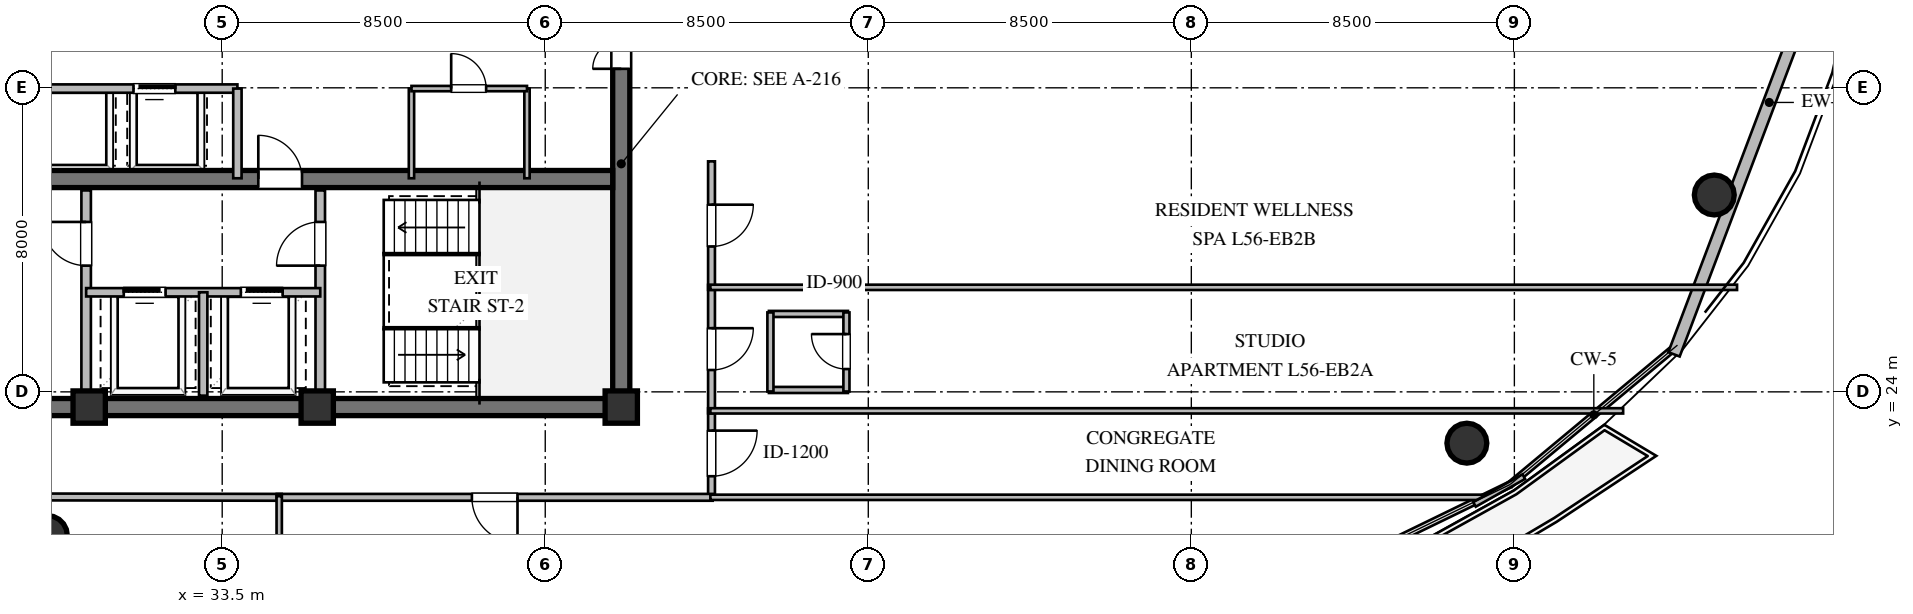
"""IFC4 building model, lengths in metres.
Left out: names, types, materials, properties, quantities, classifications, styles, units other than length and angle.
Written with IfcOpenShell. Run it as: python <this file> out.ifc"""

import sys

from ifc_helpers import new_model, si_unit, direction, frame, frame_2d, origin, origin_2d, place, context, subcontext, project, spatial, rectangle, circle, extrude, element, fill, save


model = new_model("IFC4")
c1 = context("Model", 3, precision=1e-05, world=origin(), true_north=direction((0.0, 1.0)))
c2 = subcontext(c1, "Body", "Model", "MODEL_VIEW")
j1 = project(units=[si_unit("LENGTHUNIT", "METRE"), si_unit("PLANEANGLEUNIT", "RADIAN")], contexts=[c1])
p1 = place(None, origin())
s1 = spatial("IfcSite", under=j1, at=p1, CompositionType="ELEMENT")
p2 = place(p1, origin())
s2 = spatial("IfcBuilding", under=s1, at=p2, CompositionType="ELEMENT")
p3 = place(p2, frame((0.0, 0.0, 213.6)))
s3 = spatial("IfcBuildingStorey", under=s2, at=p3, CompositionType="ELEMENT", Elevation=213.6)
p4 = place(p3, frame((21.775, 23.6, 0.0), z_axis=(0.0, 0.0, 1.0), x_axis=(1.0, 0.0, 0.0)))
e1 = element("IfcWall", 1, at=p4, inside=s3, PredefinedType="SHEAR", context=c2, shape_type="SweptSolid", body=[
    extrude(rectangle(XDim=22.45, YDim=0.45, at=frame_2d((11.225, 0.0))), origin(), (0.0, 0.0, 1.0), 3.36),
])
p5 = place(p3, frame((44.0, 23.825, 0.0), z_axis=(0.0, 0.0, 1.0), x_axis=(0.0, 1.0, 0.0)))
e2 = element("IfcWall", 2, at=p5, inside=s3, PredefinedType="SHEAR", context=c2, shape_type="SweptSolid", body=[
    extrude(rectangle(XDim=12.35, YDim=0.45, at=frame_2d((6.175, 0.0))), origin(), (0.0, 0.0, 1.0), 3.36),
])
p6 = place(p5, frame((8.675, 0.0, 0.0)))
e3 = element("IfcOpeningElement", 3, at=p6, cuts=e2, PredefinedType="OPENING", context=c2, shape_type="SweptSolid", body=[
    extrude(rectangle(XDim=1.5, YDim=2.15, at=frame_2d((0.75, 1.075))), frame((0.0, 0.235, 0.0), z_axis=(0.0, -1.0, 0.0), x_axis=(1.0, 0.0, 0.0)), (0.0, 0.0, 1.0), 0.47),
])
p7 = place(p3, frame((22.225, 29.6, 0.0), z_axis=(0.0, 0.0, 1.0), x_axis=(1.0, 0.0, 0.0)))
e4 = element("IfcWall", 4, at=p7, inside=s3, PredefinedType="SHEAR", context=c2, shape_type="SweptSolid", body=[
    extrude(rectangle(XDim=21.55, YDim=0.45, at=frame_2d((10.775, 0.0))), origin(), (0.0, 0.0, 1.0), 3.36),
])
p8 = place(p7, frame((12.225, 0.0, 0.0)))
e5 = element("IfcOpeningElement", 5, at=p8, cuts=e4, PredefinedType="OPENING", context=c2, shape_type="SweptSolid", body=[
    extrude(rectangle(XDim=1.15, YDim=2.1, at=frame_2d((0.575, 1.05))), frame((0.0, 0.235, 0.0), z_axis=(0.0, -1.0, 0.0), x_axis=(1.0, 0.0, 0.0)), (0.0, 0.0, 1.0), 0.47),
])
for number, where, z_axis, x_axis in (
    (6, (30.0, 23.6, 0.0), (0.0, 0.0, 1.0), (1.0, 0.0, 0.0)),
    (7, (36.0, 23.6, 0.0), (0.0, 0.0, 1.0), (1.0, 0.0, 0.0)),
    (8, (44.0, 23.6, 0.0), (0.0, 0.0, 1.0), (1.0, 0.0, 0.0)),
):
    element("IfcColumn", number, at=place(p3, frame(where, z_axis=z_axis, x_axis=x_axis)), inside=s3, PredefinedType="COLUMN", context=c2, shape_type="SweptSolid", body=[
        extrude(rectangle(XDim=0.85, YDim=0.85, at=origin_2d()), origin(), (0.0, 0.0, 1.0), 3.6),
    ])
for number, where, z_axis, x_axis in (
    (9, (28.9, 20.22, 0.0), (0.0, 0.0, 1.0), (1.0, 0.0, 0.0)),
    (10, (66.25, 22.65, 0.0), (0.0, 0.0, 1.0), (1.0, 0.0, 0.0)),
    (11, (72.76, 29.18, 0.0), (0.0, 0.0, 1.0), (1.0, 0.0, 0.0)),
):
    element("IfcColumn", number, at=place(p3, frame(where, z_axis=z_axis, x_axis=x_axis)), inside=s3, PredefinedType="COLUMN", context=c2, shape_type="SweptSolid", body=[
        extrude(circle(Radius=0.525, at=origin_2d()), origin(), (0.0, 0.0, 1.0), 3.6),
    ])
p9 = place(p3, frame((76.712, 38.243, 0.0), z_axis=(0.0, 0.0, 1.0), x_axis=(-0.353659523244, -0.935374225441, 0.0)))
e12 = element("IfcWall", 12, at=p9, inside=s3, PredefinedType="STANDARD", context=c2, shape_type="SweptSolid", body=[
    extrude(rectangle(XDim=14.172, YDim=0.32, at=frame_2d((7.086, 0.0))), origin(), (0.0, 0.0, 1.0), 3.36),
])
p10 = place(p3, frame((29.92, 23.9, 0.0), z_axis=(0.0, 0.0, 1.0), x_axis=(0.0, 1.0, 0.0)))
e13 = element("IfcWall", 13, at=p10, inside=s3, PredefinedType="SOLIDWALL", context=c2, shape_type="SweptSolid", body=[
    extrude(rectangle(XDim=5.4, YDim=0.25, at=frame_2d((2.7, 0.0))), origin(), (0.0, 0.0, 1.0), 3.36),
])
p11 = place(p10, frame((3.421, 0.0, 0.0)))
e14 = element("IfcOpeningElement", 14, at=p11, cuts=e13, PredefinedType="OPENING", context=c2, shape_type="SweptSolid", body=[
    extrude(rectangle(XDim=1.15, YDim=2.1, at=frame_2d((0.575, 1.05))), frame((0.0, 0.135, 0.0), z_axis=(0.0, -1.0, 0.0), x_axis=(1.0, 0.0, 0.0)), (0.0, 0.0, 1.0), 0.27),
])
p12 = place(p3, frame((36.08, 23.9, 0.0), z_axis=(0.0, 0.0, 1.0), x_axis=(0.0, 1.0, 0.0)))
e15 = element("IfcWall", 15, at=p12, inside=s3, PredefinedType="SOLIDWALL", context=c2, shape_type="SweptSolid", body=[
    extrude(rectangle(XDim=5.4, YDim=0.25, at=frame_2d((2.7, 0.0))), origin(), (0.0, 0.0, 1.0), 3.36),
])
p13 = place(p12, frame((3.421, 0.0, 0.0)))
e16 = element("IfcOpeningElement", 16, at=p13, cuts=e15, PredefinedType="OPENING", context=c2, shape_type="SweptSolid", body=[
    extrude(rectangle(XDim=1.15, YDim=2.1, at=frame_2d((0.575, 1.05))), frame((0.0, 0.135, 0.0), z_axis=(0.0, -1.0, 0.0), x_axis=(1.0, 0.0, 0.0)), (0.0, 0.0, 1.0), 0.27),
])
p14 = place(p3, frame((29.92, 26.62, 0.0), z_axis=(0.0, 0.0, 1.0), x_axis=(1.0, 0.0, 0.0)))
e17 = element("IfcWall", 17, at=p14, inside=s3, PredefinedType="SOLIDWALL", context=c2, shape_type="SweptSolid", body=[
    extrude(rectangle(XDim=6.16, YDim=0.22, at=frame_2d((3.08, 0.0))), origin(), (0.0, 0.0, 1.0), 3.36),
])
p15 = place(p14, frame((0.99, 0.0, 0.0)))
e18 = element("IfcOpeningElement", 18, at=p15, cuts=e17, PredefinedType="OPENING", context=c2, shape_type="SweptSolid", body=[
    extrude(rectangle(XDim=1.1, YDim=2.1, at=frame_2d((0.55, 1.05))), frame((0.0, 0.12, 0.0), z_axis=(0.0, -1.0, 0.0), x_axis=(1.0, 0.0, 0.0)), (0.0, 0.0, 1.0), 0.24),
])
p16 = place(p14, frame((4.07, 0.0, 0.0)))
e19 = element("IfcOpeningElement", 19, at=p16, cuts=e17, PredefinedType="OPENING", context=c2, shape_type="SweptSolid", body=[
    extrude(rectangle(XDim=1.1, YDim=2.1, at=frame_2d((0.55, 1.05))), frame((0.0, 0.12, 0.0), z_axis=(0.0, -1.0, 0.0), x_axis=(1.0, 0.0, 0.0)), (0.0, 0.0, 1.0), 0.24),
])
p17 = place(p3, frame((33.0, 23.9, 0.0), z_axis=(0.0, 0.0, 1.0), x_axis=(0.0, 1.0, 0.0)))
e20 = element("IfcWall", 20, at=p17, inside=s3, PredefinedType="SOLIDWALL", context=c2, shape_type="SweptSolid", body=[
    extrude(rectangle(XDim=2.72, YDim=0.22, at=frame_2d((1.36, 0.0))), origin(), (0.0, 0.0, 1.0), 3.36),
])
p18 = place(p3, frame((26.1, 31.98, 0.0), z_axis=(0.0, 0.0, 1.0), x_axis=(1.0, 0.0, 0.0)))
e21 = element("IfcWall", 21, at=p18, inside=s3, PredefinedType="SOLIDWALL", context=c2, shape_type="SweptSolid", body=[
    extrude(rectangle(XDim=7.8, YDim=0.22, at=frame_2d((3.9, 0.0))), origin(), (0.0, 0.0, 1.0), 3.36),
])
p19 = place(p18, frame((1.4, 0.0, 0.0)))
e22 = element("IfcOpeningElement", 22, at=p19, cuts=e21, PredefinedType="OPENING", context=c2, shape_type="SweptSolid", body=[
    extrude(rectangle(XDim=1.1, YDim=2.1, at=frame_2d((0.55, 1.05))), frame((0.0, 0.12, 0.0), z_axis=(0.0, -1.0, 0.0), x_axis=(1.0, 0.0, 0.0)), (0.0, 0.0, 1.0), 0.24),
])
p20 = place(p18, frame((5.066, 0.0, 0.0)))
e23 = element("IfcOpeningElement", 23, at=p20, cuts=e21, PredefinedType="OPENING", context=c2, shape_type="SweptSolid", body=[
    extrude(rectangle(XDim=1.1, YDim=2.1, at=frame_2d((0.55, 1.05))), frame((0.0, 0.12, 0.0), z_axis=(0.0, -1.0, 0.0), x_axis=(1.0, 0.0, 0.0)), (0.0, 0.0, 1.0), 0.24),
])
p21 = place(p3, frame((33.9, 29.62, 0.0), z_axis=(0.0, 0.0, 1.0), x_axis=(0.0, 1.0, 0.0)))
e24 = element("IfcWall", 24, at=p21, inside=s3, PredefinedType="SOLIDWALL", context=c2, shape_type="SweptSolid", body=[
    extrude(rectangle(XDim=2.36, YDim=0.22, at=frame_2d((1.18, 0.0))), origin(), (0.0, 0.0, 1.0), 3.36),
])
for number, where, z_axis, x_axis in (
    (25, (38.48, 29.62, 0.0), (0.0, 0.0, 1.0), (0.0, 1.0, 0.0)),
    (26, (41.52, 29.62, 0.0), (0.0, 0.0, 1.0), (0.0, 1.0, 0.0)),
):
    element("IfcWall", number, at=place(p3, frame(where, z_axis=z_axis, x_axis=x_axis)), inside=s3, PredefinedType="PARTITIONING", context=c2, shape_type="SweptSolid", body=[
        extrude(rectangle(XDim=2.36, YDim=0.14, at=frame_2d((1.18, 0.0))), origin(), (0.0, 0.0, 1.0), 3.36),
    ])
p22 = place(p3, frame((38.48, 31.98, 0.0), z_axis=(0.0, 0.0, 1.0), x_axis=(1.0, 0.0, 0.0)))
e27 = element("IfcWall", 27, at=p22, inside=s3, PredefinedType="PARTITIONING", context=c2, shape_type="SweptSolid", body=[
    extrude(rectangle(XDim=3.04, YDim=0.14, at=frame_2d((1.52, 0.0))), origin(), (0.0, 0.0, 1.0), 3.36),
])
p23 = place(p22, frame((1.045, 0.0, 0.0)))
e28 = element("IfcOpeningElement", 28, at=p23, cuts=e27, PredefinedType="OPENING", context=c2, shape_type="SweptSolid", body=[
    extrude(rectangle(XDim=0.92, YDim=2.1, at=frame_2d((0.46, 1.05))), frame((0.0, 0.08, 0.0), z_axis=(0.0, -1.0, 0.0), x_axis=(1.0, 0.0, 0.0)), (0.0, 0.0, 1.0), 0.16),
])
p24 = place(p3, frame((47.885, 24.05, 0.0), z_axis=(0.0, 0.0, 1.0), x_axis=(1.0, 0.0, 0.0)))
e29 = element("IfcWall", 29, at=p24, inside=s3, PredefinedType="PLUMBINGWALL", context=c2, shape_type="SweptSolid", body=[
    extrude(rectangle(XDim=2.08, YDim=0.16, at=frame_2d((1.04, 0.0))), origin(), (0.0, 0.0, 1.0), 2.806),
])
for number, where, z_axis, x_axis in (
    (30, (47.885, 26.05, 0.0), (0.0, 0.0, 1.0), (1.0, 0.0, 0.0)),
    (31, (47.925, 24.01, 0.0), (0.0, 0.0, 1.0), (0.0, 1.0, 0.0)),
):
    element("IfcWall", number, at=place(p3, frame(where, z_axis=z_axis, x_axis=x_axis)), inside=s3, PredefinedType="PLUMBINGWALL", context=c2, shape_type="SweptSolid", body=[
        extrude(rectangle(XDim=2.08, YDim=0.16, at=frame_2d((1.04, 0.0))), origin(), (0.0, 0.0, 1.0), 3.36),
    ])
p25 = place(p3, frame((49.925, 24.01, 0.0), z_axis=(0.0, 0.0, 1.0), x_axis=(0.0, 1.0, 0.0)))
e32 = element("IfcWall", 32, at=p25, inside=s3, PredefinedType="PLUMBINGWALL", context=c2, shape_type="SweptSolid", body=[
    extrude(rectangle(XDim=2.08, YDim=0.16, at=frame_2d((1.04, 0.0))), origin(), (0.0, 0.0, 1.0), 3.36),
])
p26 = place(p25, frame((0.59, 0.0, 0.0)))
e33 = element("IfcOpeningElement", 33, at=p26, cuts=e32, PredefinedType="OPENING", context=c2, shape_type="SweptSolid", body=[
    extrude(rectangle(XDim=0.92, YDim=2.1, at=frame_2d((0.46, 1.05))), frame((0.0, 0.09, 0.0), z_axis=(0.0, -1.0, 0.0), x_axis=(1.0, 0.0, 0.0)), (0.0, 0.0, 1.0), 0.18),
])
p27 = place(p3, frame((46.375, 23.565, 0.0), z_axis=(0.0, 0.0, 1.0), x_axis=(0.0, -1.0, 0.0)))
e34 = element("IfcWall", 34, at=p27, inside=s3, PredefinedType="PARTITIONING", context=c2, shape_type="SweptSolid", body=[
    extrude(rectangle(XDim=2.37, YDim=0.18, at=frame_2d((1.185, 0.0))), origin(), (0.0, 0.0, 1.0), 3.36),
])
p28 = place(p27, frame((0.585, 0.0, 0.0)))
e35 = element("IfcOpeningElement", 35, at=p28, cuts=e34, PredefinedType="OPENING", context=c2, shape_type="SweptSolid", body=[
    extrude(rectangle(XDim=1.2, YDim=2.15, at=frame_2d((0.6, 1.075))), frame((0.0, 0.1, 0.0), z_axis=(0.0, -1.0, 0.0), x_axis=(1.0, 0.0, 0.0)), (0.0, 0.0, 1.0), 0.2),
])
p29 = place(p3, frame((46.375, 26.815, 0.0), z_axis=(0.0, 0.0, 1.0), x_axis=(0.0, -1.0, 0.0)))
e36 = element("IfcWall", 36, at=p29, inside=s3, PredefinedType="PARTITIONING", context=c2, shape_type="SweptSolid", body=[
    extrude(rectangle(XDim=3.38, YDim=0.18, at=frame_2d((1.69, 0.0))), origin(), (0.0, 0.0, 1.0), 3.36),
])
p30 = place(p29, frame((1.14, 0.0, 0.0)))
e37 = element("IfcOpeningElement", 37, at=p30, cuts=e36, PredefinedType="OPENING", context=c2, shape_type="SweptSolid", body=[
    extrude(rectangle(XDim=1.1, YDim=2.1, at=frame_2d((0.55, 1.05))), frame((0.0, 0.1, 0.0), z_axis=(0.0, -1.0, 0.0), x_axis=(1.0, 0.0, 0.0)), (0.0, 0.0, 1.0), 0.2),
])
p31 = place(p3, frame((46.375, 30.065, 0.0), z_axis=(0.0, 0.0, 1.0), x_axis=(0.0, -1.0, 0.0)))
e38 = element("IfcWall", 38, at=p31, inside=s3, PredefinedType="PARTITIONING", context=c2, shape_type="SweptSolid", body=[
    extrude(rectangle(XDim=3.38, YDim=0.18, at=frame_2d((1.69, 0.0))), origin(), (0.0, 0.0, 1.0), 3.36),
])
p32 = place(p31, frame((1.14, 0.0, 0.0)))
e39 = element("IfcOpeningElement", 39, at=p32, cuts=e38, PredefinedType="OPENING", context=c2, shape_type="SweptSolid", body=[
    extrude(rectangle(XDim=1.1, YDim=2.1, at=frame_2d((0.55, 1.05))), frame((0.0, 0.1, 0.0), z_axis=(0.0, -1.0, 0.0), x_axis=(1.0, 0.0, 0.0)), (0.0, 0.0, 1.0), 0.2),
])
p33 = place(p3, frame((35.065, 21.225, 0.0), z_axis=(0.0, 0.0, 1.0), x_axis=(-0.999998948453, 0.001450204611, 0.0)))
e40 = element("IfcWall", 40, at=p33, inside=s3, PredefinedType="PARTITIONING", context=c2, shape_type="SweptSolid", body=[
    extrude(rectangle(XDim=11.784, YDim=0.18, at=frame_2d((5.892, 0.0))), origin(), (0.0, 0.0, 1.0), 2.806),
])
p34 = place(p33, frame((7.779, 0.0, 0.0)))
e41 = element("IfcOpeningElement", 41, at=p34, cuts=e40, PredefinedType="OPENING", context=c2, shape_type="SweptSolid", body=[
    extrude(rectangle(XDim=1.1, YDim=2.1, at=frame_2d((0.55, 1.05))), frame((0.0, 0.1, 0.0), z_axis=(0.0, -1.0, 0.0), x_axis=(1.0, 0.0, 0.0)), (0.0, 0.0, 1.0), 0.2),
])
p35 = place(p3, frame((46.405, 21.225, 0.0), z_axis=(0.0, 0.0, 1.0), x_axis=(-1.0, 0.0, 0.0)))
e42 = element("IfcWall", 42, at=p35, inside=s3, PredefinedType="PARTITIONING", context=c2, shape_type="SweptSolid", body=[
    extrude(rectangle(XDim=11.47, YDim=0.18, at=frame_2d((5.735, 0.0))), origin(), (0.0, 0.0, 1.0), 2.996),
])
p36 = place(p35, frame((5.135, 0.0, 0.0)))
e43 = element("IfcOpeningElement", 43, at=p36, cuts=e42, PredefinedType="OPENING", context=c2, shape_type="SweptSolid", body=[
    extrude(rectangle(XDim=1.2, YDim=2.15, at=frame_2d((0.6, 1.075))), frame((0.0, 0.1, 0.0), z_axis=(0.0, -1.0, 0.0), x_axis=(1.0, 0.0, 0.0)), (0.0, 0.0, 1.0), 0.2),
])
p37 = place(p3, frame((46.345, 23.5, 0.0), z_axis=(0.0, 0.0, 1.0), x_axis=(1.0, 0.0, 0.0)))
e44 = element("IfcWall", 44, at=p37, inside=s3, PredefinedType="PARTITIONING", context=c2, shape_type="SweptSolid", body=[
    extrude(rectangle(XDim=24.017, YDim=0.14, at=frame_2d((12.009, 0.0))), origin(), (0.0, 0.0, 1.0), 2.806),
])
p38 = place(p3, frame((66.684, 21.225, 0.0), z_axis=(0.0, 0.0, 1.0), x_axis=(-1.0, 0.0, 0.0)))
e45 = element("IfcWall", 45, at=p38, inside=s3, PredefinedType="PARTITIONING", context=c2, shape_type="SweptSolid", body=[
    extrude(rectangle(XDim=20.339, YDim=0.14, at=frame_2d((10.169, 0.0))), origin(), (0.0, 0.0, 1.0), 2.996),
])
p39 = place(p3, frame((67.748, 21.77, 0.0), z_axis=(0.0, 0.0, 1.0), x_axis=(-0.871352238731, -0.490658003153, 0.0)))
e46 = element("IfcWall", 46, at=p39, inside=s3, PredefinedType="PARTITIONING", context=c2, shape_type="SweptSolid", body=[
    extrude(rectangle(XDim=1.49, YDim=0.14, at=frame_2d((0.745, 0.0))), origin(), (0.0, 0.0, 1.0), 3.36),
])
p40 = place(p3, frame((46.345, 26.75, 0.0), z_axis=(0.0, 0.0, 1.0), x_axis=(1.0, 0.0, 0.0)))
e47 = element("IfcWall", 47, at=p40, inside=s3, PredefinedType="PARTITIONING", context=c2, shape_type="SweptSolid", body=[
    extrude(rectangle(XDim=27.014, YDim=0.14, at=frame_2d((13.507, 0.0))), origin(), (0.0, 0.0, 1.0), 2.806),
])
p41 = place(p3, frame((35.0, 21.255, 0.0), z_axis=(0.0, 0.0, 1.0), x_axis=(0.0, -1.0, 0.0)))
e48 = element("IfcWall", 48, at=p41, inside=s3, PredefinedType="PARTITIONING", context=c2, shape_type="SweptSolid", body=[
    extrude(rectangle(XDim=4.169, YDim=0.14, at=frame_2d((2.085, 0.0))), origin(), (0.0, 0.0, 1.0), 3.36),
])
p42 = place(p11, origin())
e49 = element("IfcDoor", 49, at=p42, inside=s3, OperationType="SINGLE_SWING_RIGHT", PredefinedType="DOOR", context=c2, shape_type="SweptSolid", body=[
    extrude(rectangle(XDim=1.15, YDim=2.1, at=frame_2d((0.575, 1.05))), frame((0.0, 0.025, 0.0), z_axis=(0.0, -1.0, 0.0), x_axis=(1.0, 0.0, 0.0)), (0.0, 0.0, 1.0), 0.05),
])
fill(e14, e49)
p43 = place(p13, origin())
e50 = element("IfcDoor", 50, at=p43, inside=s3, OperationType="SINGLE_SWING_LEFT", PredefinedType="DOOR", context=c2, shape_type="SweptSolid", body=[
    extrude(rectangle(XDim=1.15, YDim=2.1, at=frame_2d((0.575, 1.05))), frame((0.0, 0.025, 0.0), z_axis=(0.0, -1.0, 0.0), x_axis=(1.0, 0.0, 0.0)), (0.0, 0.0, 1.0), 0.05),
])
fill(e16, e50)
p44 = place(p15, origin())
e51 = element("IfcDoor", 51, at=p44, inside=s3, OperationType="SLIDING_TO_LEFT", PredefinedType="DOOR", context=c2, shape_type="SweptSolid", body=[
    extrude(rectangle(XDim=1.1, YDim=2.1, at=frame_2d((0.55, 1.05))), frame((0.0, 0.025, 0.0), z_axis=(0.0, -1.0, 0.0), x_axis=(1.0, 0.0, 0.0)), (0.0, 0.0, 1.0), 0.05),
])
fill(e18, e51)
p45 = place(p16, origin())
e52 = element("IfcDoor", 52, at=p45, inside=s3, OperationType="SLIDING_TO_RIGHT", PredefinedType="DOOR", context=c2, shape_type="SweptSolid", body=[
    extrude(rectangle(XDim=1.1, YDim=2.1, at=frame_2d((0.55, 1.05))), frame((0.0, 0.025, 0.0), z_axis=(0.0, -1.0, 0.0), x_axis=(1.0, 0.0, 0.0)), (0.0, 0.0, 1.0), 0.05),
])
fill(e19, e52)
p46 = place(p8, origin())
e53 = element("IfcDoor", 53, at=p46, inside=s3, OperationType="SINGLE_SWING_LEFT", PredefinedType="DOOR", context=c2, shape_type="SweptSolid", body=[
    extrude(rectangle(XDim=1.15, YDim=2.1, at=frame_2d((0.575, 1.05))), frame((0.0, 0.025, 0.0), z_axis=(0.0, -1.0, 0.0), x_axis=(1.0, 0.0, 0.0)), (0.0, 0.0, 1.0), 0.05),
])
fill(e5, e53)
p47 = place(p6, origin())
e54 = element("IfcDoor", 54, at=p47, inside=s3, OperationType="DOUBLE_DOOR_SINGLE_SWING", PredefinedType="DOOR", context=c2, shape_type="SweptSolid", body=[
    extrude(rectangle(XDim=1.5, YDim=2.15, at=frame_2d((0.75, 1.075))), frame((0.0, 0.025, 0.0), z_axis=(0.0, -1.0, 0.0), x_axis=(1.0, 0.0, 0.0)), (0.0, 0.0, 1.0), 0.05),
])
fill(e3, e54)
p48 = place(p20, origin())
e55 = element("IfcDoor", 55, at=p48, inside=s3, OperationType="SLIDING_TO_RIGHT", PredefinedType="DOOR", context=c2, shape_type="SweptSolid", body=[
    extrude(rectangle(XDim=1.1, YDim=2.1, at=frame_2d((0.55, 1.05))), frame((0.0, 0.025, 0.0), z_axis=(0.0, -1.0, 0.0), x_axis=(1.0, 0.0, 0.0)), (0.0, 0.0, 1.0), 0.05),
])
fill(e23, e55)
p49 = place(p23, origin())
e56 = element("IfcDoor", 56, at=p49, inside=s3, OperationType="SINGLE_SWING_LEFT", PredefinedType="DOOR", context=c2, shape_type="SweptSolid", body=[
    extrude(rectangle(XDim=0.92, YDim=2.1, at=frame_2d((0.46, 1.05))), frame((0.0, 0.025, 0.0), z_axis=(0.0, -1.0, 0.0), x_axis=(1.0, 0.0, 0.0)), (0.0, 0.0, 1.0), 0.05),
])
fill(e28, e56)
p50 = place(p26, origin())
e57 = element("IfcDoor", 57, at=p50, inside=s3, OperationType="SINGLE_SWING_RIGHT", PredefinedType="DOOR", context=c2, shape_type="SweptSolid", body=[
    extrude(rectangle(XDim=0.92, YDim=2.1, at=frame_2d((0.46, 1.05))), frame((0.0, 0.025, 0.0), z_axis=(0.0, -1.0, 0.0), x_axis=(1.0, 0.0, 0.0)), (0.0, 0.0, 1.0), 0.05),
])
fill(e33, e57)
p51 = place(p28, origin())
e58 = element("IfcDoor", 58, at=p51, inside=s3, OperationType="SINGLE_SWING_LEFT", PredefinedType="DOOR", context=c2, shape_type="SweptSolid", body=[
    extrude(rectangle(XDim=1.2, YDim=2.15, at=frame_2d((0.6, 1.075))), frame((0.0, 0.025, 0.0), z_axis=(0.0, -1.0, 0.0), x_axis=(1.0, 0.0, 0.0)), (0.0, 0.0, 1.0), 0.05),
])
fill(e35, e58)
p52 = place(p30, origin())
e59 = element("IfcDoor", 59, at=p52, inside=s3, OperationType="SINGLE_SWING_LEFT", PredefinedType="DOOR", context=c2, shape_type="SweptSolid", body=[
    extrude(rectangle(XDim=1.1, YDim=2.1, at=frame_2d((0.55, 1.05))), frame((0.0, 0.025, 0.0), z_axis=(0.0, -1.0, 0.0), x_axis=(1.0, 0.0, 0.0)), (0.0, 0.0, 1.0), 0.05),
])
fill(e37, e59)
p53 = place(p32, origin())
e60 = element("IfcDoor", 60, at=p53, inside=s3, OperationType="SINGLE_SWING_LEFT", PredefinedType="DOOR", context=c2, shape_type="SweptSolid", body=[
    extrude(rectangle(XDim=1.1, YDim=2.1, at=frame_2d((0.55, 1.05))), frame((0.0, 0.025, 0.0), z_axis=(0.0, -1.0, 0.0), x_axis=(1.0, 0.0, 0.0)), (0.0, 0.0, 1.0), 0.05),
])
fill(e39, e60)
p54 = place(p36, origin())
e61 = element("IfcDoor", 61, at=p54, inside=s3, OperationType="SINGLE_SWING_LEFT", PredefinedType="DOOR", context=c2, shape_type="SweptSolid", body=[
    extrude(rectangle(XDim=1.2, YDim=2.15, at=frame_2d((0.6, 1.075))), frame((0.0, 0.025, 0.0), z_axis=(0.0, -1.0, 0.0), x_axis=(1.0, 0.0, 0.0)), (0.0, 0.0, 1.0), 0.05),
])
fill(e43, e61)
save(model, sys.argv[1])
